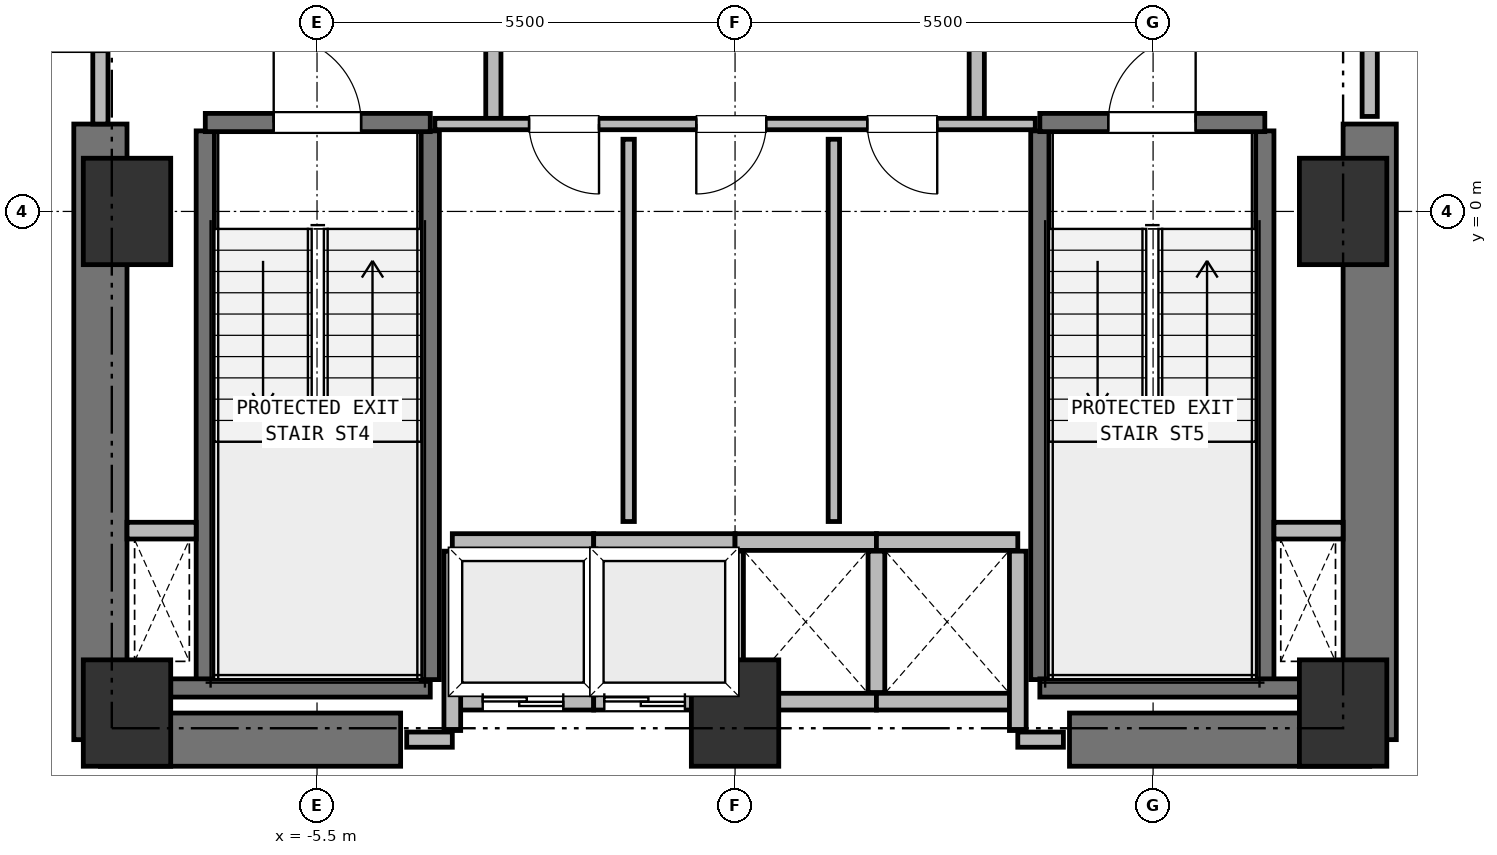
"""IFC4 building model, lengths in metres.
Left out: names, types, materials, properties, quantities, classifications, styles, units other than length and angle.
Written with IfcOpenShell. Run it as: python <this file> out.ifc"""

import sys

from ifc_helpers import new_model, si_unit, direction, frame, frame_2d, origin, origin_2d, place, context, subcontext, project, spatial, rectangle, extrude, element, fill, save


model = new_model("IFC4")
c1 = context("Model", 3, precision=1e-05, world=origin(), true_north=direction((0.0, 1.0)))
c2 = subcontext(c1, "Body", "Model", "MODEL_VIEW")
j1 = project(units=[si_unit("LENGTHUNIT", "METRE"), si_unit("PLANEANGLEUNIT", "RADIAN")], contexts=[c1])
p1 = place(None, origin())
s1 = spatial("IfcSite", under=j1, at=p1, CompositionType="ELEMENT")
p2 = place(p1, origin())
s2 = spatial("IfcBuilding", under=s1, at=p2, CompositionType="ELEMENT")
p3 = place(p2, frame((0.0, 0.0, 41.75)))
s3 = spatial("IfcBuildingStorey", under=s2, at=p3, CompositionType="ELEMENT", Elevation=41.75)
for number, where, z_axis, x_axis in (
    (1, (-8.0, -6.6, 0.0), (0.0, 0.0, 1.0), (1.0, 0.0, 0.0)),
    (2, (0.0, -6.6, 0.0), (0.0, 0.0, 1.0), (1.0, 0.0, 0.0)),
    (3, (8.0, -6.6, 0.0), (0.0, 0.0, 1.0), (1.0, 0.0, 0.0)),
    (4, (8.0, 0.0, 0.0), (0.0, 0.0, 1.0), (1.0, 0.0, 0.0)),
    (5, (-8.0, 0.0, 0.0), (0.0, 0.0, 1.0), (1.0, 0.0, 0.0)),
):
    element("IfcColumn", number, at=place(p3, frame(where, z_axis=z_axis, x_axis=x_axis)), inside=s3, PredefinedType="COLUMN", context=c2, shape_type="SweptSolid", body=[
        extrude(rectangle(XDim=1.15, YDim=1.4, at=origin_2d()), origin(), (0.0, 0.0, 1.0), 3.75),
    ])
for number, where, z_axis, x_axis in (
    (6, (-8.35, -6.95, 0.0), (0.0, 0.0, 1.0), (1.0, 0.0, 0.0)),
    (7, (4.4, -6.95, 0.0), (0.0, 0.0, 1.0), (1.0, 0.0, 0.0)),
):
    element("IfcWall", number, at=place(p3, frame(where, z_axis=z_axis, x_axis=x_axis)), inside=s3, PredefinedType="SHEAR", context=c2, shape_type="SweptSolid", body=[
        extrude(rectangle(XDim=3.95, YDim=0.7, at=frame_2d((1.975, 0.0))), origin(), (0.0, 0.0, 1.0), 3.5),
    ])
for number, where, z_axis, x_axis in (
    (8, (-8.35, -6.95, 0.0), (0.0, 0.0, 1.0), (0.0, 1.0, 0.0)),
    (9, (8.35, -6.95, 0.0), (0.0, 0.0, 1.0), (0.0, 1.0, 0.0)),
):
    element("IfcWall", number, at=place(p3, frame(where, z_axis=z_axis, x_axis=x_axis)), inside=s3, PredefinedType="SHEAR", context=c2, shape_type="SweptSolid", body=[
        extrude(rectangle(XDim=8.1, YDim=0.7, at=frame_2d((4.05, 0.0))), origin(), (0.0, 0.0, 1.0), 3.5),
    ])
p4 = place(p3, frame((-6.97, -6.16, 0.0), z_axis=(0.0, 0.0, 1.0), x_axis=(0.0, 1.0, 0.0)))
e10 = element("IfcWall", 10, at=p4, inside=s3, PredefinedType="SHEAR", context=c2, shape_type="SweptSolid", body=[
    extrude(rectangle(XDim=7.22, YDim=0.24, at=frame_2d((3.61, 0.0))), origin(), (0.0, 0.0, 1.0), 3.5),
])
p5 = place(p3, frame((-7.425, -6.27, 0.0), z_axis=(0.0, 0.0, 1.0), x_axis=(1.0, 0.0, 0.0)))
e11 = element("IfcWall", 11, at=p5, inside=s3, PredefinedType="SHEAR", context=c2, shape_type="SweptSolid", body=[
    extrude(rectangle(XDim=3.415, YDim=0.24, at=frame_2d((1.708, 0.0))), origin(), (0.0, 0.0, 1.0), 3.5),
])
p6 = place(p3, frame((-4.01, -6.16, 0.0), z_axis=(0.0, 0.0, 1.0), x_axis=(0.0, 1.0, 0.0)))
e12 = element("IfcWall", 12, at=p6, inside=s3, PredefinedType="SHEAR", context=c2, shape_type="SweptSolid", body=[
    extrude(rectangle(XDim=7.22, YDim=0.24, at=frame_2d((3.61, 0.0))), origin(), (0.0, 0.0, 1.0), 3.5),
])
p7 = place(p3, frame((-6.97, 1.17, 0.0), z_axis=(0.0, 0.0, 1.0), x_axis=(1.0, 0.0, 0.0)))
e13 = element("IfcWall", 13, at=p7, inside=s3, PredefinedType="SHEAR", context=c2, shape_type="SweptSolid", body=[
    extrude(rectangle(XDim=2.96, YDim=0.24, at=frame_2d((1.48, 0.0))), origin(), (0.0, 0.0, 1.0), 3.5),
])
p8 = place(p7, frame((0.9, 0.0, 0.0)))
e14 = element("IfcOpeningElement", 14, at=p8, cuts=e13, PredefinedType="OPENING", context=c2, shape_type="SweptSolid", body=[
    extrude(rectangle(XDim=1.15, YDim=2.15, at=frame_2d((0.575, 1.075))), frame((0.0, 0.13, 0.0), z_axis=(0.0, -1.0, 0.0), x_axis=(1.0, 0.0, 0.0)), (0.0, 0.0, 1.0), 0.26),
])
for number, where, z_axis, x_axis in (
    (15, (4.01, -6.16, 0.0), (0.0, 0.0, 1.0), (0.0, 1.0, 0.0)),
    (16, (6.97, -6.16, 0.0), (0.0, 0.0, 1.0), (0.0, 1.0, 0.0)),
):
    element("IfcWall", number, at=place(p3, frame(where, z_axis=z_axis, x_axis=x_axis)), inside=s3, PredefinedType="SHEAR", context=c2, shape_type="SweptSolid", body=[
        extrude(rectangle(XDim=7.22, YDim=0.24, at=frame_2d((3.61, 0.0))), origin(), (0.0, 0.0, 1.0), 3.5),
    ])
p9 = place(p3, frame((4.01, -6.27, 0.0), z_axis=(0.0, 0.0, 1.0), x_axis=(1.0, 0.0, 0.0)))
e17 = element("IfcWall", 17, at=p9, inside=s3, PredefinedType="SHEAR", context=c2, shape_type="SweptSolid", body=[
    extrude(rectangle(XDim=3.415, YDim=0.24, at=frame_2d((1.708, 0.0))), origin(), (0.0, 0.0, 1.0), 3.5),
])
p10 = place(p3, frame((4.01, 1.17, 0.0), z_axis=(0.0, 0.0, 1.0), x_axis=(1.0, 0.0, 0.0)))
e18 = element("IfcWall", 18, at=p10, inside=s3, PredefinedType="SHEAR", context=c2, shape_type="SweptSolid", body=[
    extrude(rectangle(XDim=2.96, YDim=0.24, at=frame_2d((1.48, 0.0))), origin(), (0.0, 0.0, 1.0), 3.5),
])
p11 = place(p10, frame((0.9, 0.0, 0.0)))
e19 = element("IfcOpeningElement", 19, at=p11, cuts=e18, PredefinedType="OPENING", context=c2, shape_type="SweptSolid", body=[
    extrude(rectangle(XDim=1.15, YDim=2.15, at=frame_2d((0.575, 1.075))), frame((0.0, 0.13, 0.0), z_axis=(0.0, -1.0, 0.0), x_axis=(1.0, 0.0, 0.0)), (0.0, 0.0, 1.0), 0.26),
])
for number, where, z_axis, x_axis in (
    (20, (-8.0, -4.2, 0.0), (0.0, 0.0, 1.0), (1.0, 0.0, 0.0)),
    (21, (7.09, -4.2, 0.0), (0.0, 0.0, 1.0), (1.0, 0.0, 0.0)),
):
    element("IfcWall", number, at=place(p3, frame(where, z_axis=z_axis, x_axis=x_axis)), inside=s3, PredefinedType="PARTITIONING", context=c2, shape_type="SweptSolid", body=[
        extrude(rectangle(XDim=0.91, YDim=0.22, at=frame_2d((0.455, 0.0))), origin(), (0.0, 0.0, 1.0), 3.5),
    ])
p12 = place(p3, frame((-3.72, -6.45, 0.0), z_axis=(0.0, 0.0, 1.0), x_axis=(1.0, 0.0, 0.0)))
e22 = element("IfcWall", 22, at=p12, inside=s3, PredefinedType="PARTITIONING", context=c2, shape_type="SweptSolid", body=[
    extrude(rectangle(XDim=1.86, YDim=0.22, at=frame_2d((0.93, 0.0))), origin(), (0.0, 0.0, 1.0), 3.08),
])
p13 = place(p12, frame((0.4, 0.0, 0.0)))
e23 = element("IfcOpeningElement", 23, at=p13, cuts=e22, PredefinedType="OPENING", context=c2, shape_type="SweptSolid", body=[
    extrude(rectangle(XDim=1.06, YDim=2.15, at=frame_2d((0.53, 1.075))), frame((0.0, 0.12, 0.0), z_axis=(0.0, -1.0, 0.0), x_axis=(1.0, 0.0, 0.0)), (0.0, 0.0, 1.0), 0.24),
])
p14 = place(p3, frame((-3.72, -4.35, 0.0), z_axis=(0.0, 0.0, 1.0), x_axis=(1.0, 0.0, 0.0)))
e24 = element("IfcWall", 24, at=p14, inside=s3, PredefinedType="PARTITIONING", context=c2, shape_type="SweptSolid", body=[
    extrude(rectangle(XDim=1.86, YDim=0.22, at=frame_2d((0.93, 0.0))), origin(), (0.0, 0.0, 1.0), 3.5),
])
p15 = place(p3, frame((-3.72, -6.83, 0.0), z_axis=(0.0, 0.0, 1.0), x_axis=(0.0, 1.0, 0.0)))
e25 = element("IfcWall", 25, at=p15, inside=s3, PredefinedType="PARTITIONING", context=c2, shape_type="SweptSolid", body=[
    extrude(rectangle(XDim=2.36, YDim=0.22, at=frame_2d((1.18, 0.0))), origin(), (0.0, 0.0, 1.0), 3.5),
])
p16 = place(p3, frame((-1.86, -6.33, 0.0), z_axis=(0.0, 0.0, 1.0), x_axis=(0.0, 1.0, 0.0)))
e26 = element("IfcWall", 26, at=p16, inside=s3, PredefinedType="PARTITIONING", context=c2, shape_type="SweptSolid", body=[
    extrude(rectangle(XDim=1.86, YDim=0.22, at=frame_2d((0.93, 0.0))), origin(), (0.0, 0.0, 1.0), 3.5),
])
p17 = place(p3, frame((-1.86, -6.45, 0.0), z_axis=(0.0, 0.0, 1.0), x_axis=(1.0, 0.0, 0.0)))
e27 = element("IfcWall", 27, at=p17, inside=s3, PredefinedType="PARTITIONING", context=c2, shape_type="SweptSolid", body=[
    extrude(rectangle(XDim=1.86, YDim=0.22, at=frame_2d((0.93, 0.0))), origin(), (0.0, 0.0, 1.0), 3.08),
])
p18 = place(p17, frame((0.14, 0.0, 0.0)))
e28 = element("IfcOpeningElement", 28, at=p18, cuts=e27, PredefinedType="OPENING", context=c2, shape_type="SweptSolid", body=[
    extrude(rectangle(XDim=1.06, YDim=2.15, at=frame_2d((0.53, 1.075))), frame((0.0, 0.12, 0.0), z_axis=(0.0, -1.0, 0.0), x_axis=(1.0, 0.0, 0.0)), (0.0, 0.0, 1.0), 0.24),
])
for number, where, z_axis, x_axis in (
    (29, (-1.86, -4.35, 0.0), (0.0, 0.0, 1.0), (1.0, 0.0, 0.0)),
    (30, (0.0, -6.33, 0.0), (0.0, 0.0, 1.0), (0.0, 1.0, 0.0)),
):
    element("IfcWall", number, at=place(p3, frame(where, z_axis=z_axis, x_axis=x_axis)), inside=s3, PredefinedType="PARTITIONING", context=c2, shape_type="SweptSolid", body=[
        extrude(rectangle(XDim=1.86, YDim=0.22, at=frame_2d((0.93, 0.0))), origin(), (0.0, 0.0, 1.0), 3.5),
    ])
p19 = place(p3, frame((0.0, -6.45, 0.0), z_axis=(0.0, 0.0, 1.0), x_axis=(1.0, 0.0, 0.0)))
e31 = element("IfcWall", 31, at=p19, inside=s3, PredefinedType="PARTITIONING", context=c2, shape_type="SweptSolid", body=[
    extrude(rectangle(XDim=1.86, YDim=0.22, at=frame_2d((0.93, 0.0))), origin(), (0.0, 0.0, 1.0), 3.08),
])
for number, where, z_axis, x_axis in (
    (32, (0.0, -4.35, 0.0), (0.0, 0.0, 1.0), (1.0, 0.0, 0.0)),
    (33, (1.86, -6.33, 0.0), (0.0, 0.0, 1.0), (0.0, 1.0, 0.0)),
):
    element("IfcWall", number, at=place(p3, frame(where, z_axis=z_axis, x_axis=x_axis)), inside=s3, PredefinedType="PARTITIONING", context=c2, shape_type="SweptSolid", body=[
        extrude(rectangle(XDim=1.86, YDim=0.22, at=frame_2d((0.93, 0.0))), origin(), (0.0, 0.0, 1.0), 3.5),
    ])
p20 = place(p3, frame((1.86, -6.45, 0.0), z_axis=(0.0, 0.0, 1.0), x_axis=(1.0, 0.0, 0.0)))
e34 = element("IfcWall", 34, at=p20, inside=s3, PredefinedType="PARTITIONING", context=c2, shape_type="SweptSolid", body=[
    extrude(rectangle(XDim=1.86, YDim=0.22, at=frame_2d((0.93, 0.0))), origin(), (0.0, 0.0, 1.0), 3.08),
])
p21 = place(p3, frame((1.86, -4.35, 0.0), z_axis=(0.0, 0.0, 1.0), x_axis=(1.0, 0.0, 0.0)))
e35 = element("IfcWall", 35, at=p21, inside=s3, PredefinedType="PARTITIONING", context=c2, shape_type="SweptSolid", body=[
    extrude(rectangle(XDim=1.86, YDim=0.22, at=frame_2d((0.93, 0.0))), origin(), (0.0, 0.0, 1.0), 3.5),
])
p22 = place(p3, frame((3.72, -6.83, 0.0), z_axis=(0.0, 0.0, 1.0), x_axis=(0.0, 1.0, 0.0)))
e36 = element("IfcWall", 36, at=p22, inside=s3, PredefinedType="PARTITIONING", context=c2, shape_type="SweptSolid", body=[
    extrude(rectangle(XDim=2.36, YDim=0.22, at=frame_2d((1.18, 0.0))), origin(), (0.0, 0.0, 1.0), 3.5),
])
p23 = place(p3, frame((-3.18, 1.15, 0.0), z_axis=(0.0, 0.0, 1.0), x_axis=(0.0, 1.0, 0.0)))
e37 = element("IfcWall", 37, at=p23, inside=s3, PredefinedType="PARTITIONING", context=c2, shape_type="SweptSolid", body=[
    extrude(rectangle(XDim=3.3, YDim=0.2, at=frame_2d((1.65, 0.0))), origin(), (0.0, 0.0, 1.0), 3.5),
])
p24 = place(p23, frame((1.08, 0.0, 0.0)))
e38 = element("IfcOpeningElement", 38, at=p24, cuts=e37, PredefinedType="OPENING", context=c2, shape_type="SweptSolid", body=[
    extrude(rectangle(XDim=1.15, YDim=2.15, at=frame_2d((0.575, 1.075))), frame((0.0, 0.11, 0.0), z_axis=(0.0, -1.0, 0.0), x_axis=(1.0, 0.0, 0.0)), (0.0, 0.0, 1.0), 0.22),
])
p25 = place(p3, frame((3.18, 1.15, 0.0), z_axis=(0.0, 0.0, 1.0), x_axis=(0.0, 1.0, 0.0)))
e39 = element("IfcWall", 39, at=p25, inside=s3, PredefinedType="PARTITIONING", context=c2, shape_type="SweptSolid", body=[
    extrude(rectangle(XDim=3.3, YDim=0.2, at=frame_2d((1.65, 0.0))), origin(), (0.0, 0.0, 1.0), 3.5),
])
p26 = place(p25, frame((1.08, 0.0, 0.0)))
e40 = element("IfcOpeningElement", 40, at=p26, cuts=e39, PredefinedType="OPENING", context=c2, shape_type="SweptSolid", body=[
    extrude(rectangle(XDim=1.15, YDim=2.15, at=frame_2d((0.575, 1.075))), frame((0.0, 0.11, 0.0), z_axis=(0.0, -1.0, 0.0), x_axis=(1.0, 0.0, 0.0)), (0.0, 0.0, 1.0), 0.22),
])
p27 = place(p3, frame((-8.35, 1.15, 0.0), z_axis=(0.0, 0.0, 1.0), x_axis=(0.0, 1.0, 0.0)))
e41 = element("IfcWall", 41, at=p27, inside=s3, PredefinedType="PARTITIONING", context=c2, shape_type="SweptSolid", body=[
    extrude(rectangle(XDim=5.4, YDim=0.2, at=frame_2d((2.7, 0.0))), origin(), (0.0, 0.0, 1.0), 3.5),
])
p28 = place(p27, frame((0.95, 0.0, 0.0)))
e42 = element("IfcOpeningElement", 42, at=p28, cuts=e41, PredefinedType="OPENING", context=c2, shape_type="SweptSolid", body=[
    extrude(rectangle(XDim=1.15, YDim=2.15, at=frame_2d((0.575, 1.075))), frame((0.0, 0.11, 0.0), z_axis=(0.0, -1.0, 0.0), x_axis=(1.0, 0.0, 0.0)), (0.0, 0.0, 1.0), 0.22),
])
p29 = place(p3, frame((8.35, 1.25, 0.0), z_axis=(0.0, 0.0, 1.0), x_axis=(0.0, 1.0, 0.0)))
e43 = element("IfcWall", 43, at=p29, inside=s3, PredefinedType="PARTITIONING", context=c2, shape_type="SweptSolid", body=[
    extrude(rectangle(XDim=5.3, YDim=0.2, at=frame_2d((2.65, 0.0))), origin(), (0.0, 0.0, 1.0), 3.5),
])
p30 = place(p29, frame((0.95, 0.0, 0.0)))
e44 = element("IfcOpeningElement", 44, at=p30, cuts=e43, PredefinedType="OPENING", context=c2, shape_type="SweptSolid", body=[
    extrude(rectangle(XDim=1.15, YDim=2.15, at=frame_2d((0.575, 1.075))), frame((0.0, 0.11, 0.0), z_axis=(0.0, -1.0, 0.0), x_axis=(1.0, 0.0, 0.0)), (0.0, 0.0, 1.0), 0.22),
])
p31 = place(p3, frame((3.95, 1.15, 0.0), z_axis=(0.0, 0.0, 1.0), x_axis=(-1.0, 0.0, 0.0)))
e45 = element("IfcWall", 45, at=p31, inside=s3, PredefinedType="PARTITIONING", context=c2, shape_type="SweptSolid", body=[
    extrude(rectangle(XDim=7.9, YDim=0.15, at=frame_2d((3.95, 0.0))), origin(), (0.0, 0.0, 1.0), 3.5),
])
p32 = place(p31, frame((5.74, 0.0, 0.0)))
e46 = element("IfcOpeningElement", 46, at=p32, cuts=e45, PredefinedType="OPENING", context=c2, shape_type="SweptSolid", body=[
    extrude(rectangle(XDim=0.92, YDim=2.05, at=frame_2d((0.46, 1.025))), frame((0.0, 0.085, 0.0), z_axis=(0.0, -1.0, 0.0), x_axis=(1.0, 0.0, 0.0)), (0.0, 0.0, 1.0), 0.17),
])
p33 = place(p31, frame((3.54, 0.0, 0.0)))
e47 = element("IfcOpeningElement", 47, at=p33, cuts=e45, PredefinedType="OPENING", context=c2, shape_type="SweptSolid", body=[
    extrude(rectangle(XDim=0.92, YDim=2.05, at=frame_2d((0.46, 1.025))), frame((0.0, 0.085, 0.0), z_axis=(0.0, -1.0, 0.0), x_axis=(1.0, 0.0, 0.0)), (0.0, 0.0, 1.0), 0.17),
])
p34 = place(p31, frame((1.29, 0.0, 0.0)))
e48 = element("IfcOpeningElement", 48, at=p34, cuts=e45, PredefinedType="OPENING", context=c2, shape_type="SweptSolid", body=[
    extrude(rectangle(XDim=0.92, YDim=2.05, at=frame_2d((0.46, 1.025))), frame((0.0, 0.085, 0.0), z_axis=(0.0, -1.0, 0.0), x_axis=(1.0, 0.0, 0.0)), (0.0, 0.0, 1.0), 0.17),
])
for number, where, z_axis, x_axis in (
    (49, (-4.32, -6.95, 0.0), (0.0, 0.0, 1.0), (1.0, 0.0, 0.0)),
    (50, (3.72, -6.95, 0.0), (0.0, 0.0, 1.0), (1.0, 0.0, 0.0)),
):
    element("IfcWall", number, at=place(p3, frame(where, z_axis=z_axis, x_axis=x_axis)), inside=s3, PredefinedType="PARTITIONING", context=c2, shape_type="SweptSolid", body=[
        extrude(rectangle(XDim=0.6, YDim=0.2, at=frame_2d((0.3, 0.0))), origin(), (0.0, 0.0, 1.0), 3.5),
    ])
for number, where, z_axis, x_axis in (
    (51, (-1.4, -4.08, 0.0), (0.0, 0.0, 1.0), (0.0, 1.0, 0.0)),
    (52, (1.3, -4.08, 0.0), (0.0, 0.0, 1.0), (0.0, 1.0, 0.0)),
):
    element("IfcWall", number, at=place(p3, frame(where, z_axis=z_axis, x_axis=x_axis)), inside=s3, PredefinedType="PARTITIONING", context=c2, shape_type="SweptSolid", body=[
        extrude(rectangle(XDim=5.03, YDim=0.15, at=frame_2d((2.515, 0.0))), origin(), (0.0, 0.0, 1.0), 3.5),
    ])
p35 = place(p3, frame((10.752, -7.178, 0.0), z_axis=(0.0, 0.0, 1.0), x_axis=(-0.707067066127, -0.707146494016, 0.0)))
e53 = element("IfcWall", 53, at=p35, inside=s3, PredefinedType="PARTITIONING", context=c2, shape_type="SweptSolid", body=[
    extrude(rectangle(XDim=3.074, YDim=0.15, at=frame_2d((1.537, 0.0))), origin(), (0.0, 0.0, 1.0), 3.12),
])
p36 = place(p3, frame((-8.578, -9.352, 0.0), z_axis=(0.0, 0.0, 1.0), x_axis=(-0.707067066127, 0.707146494016, 0.0)))
e54 = element("IfcWall", 54, at=p36, inside=s3, PredefinedType="PARTITIONING", context=c2, shape_type="SweptSolid", body=[
    extrude(rectangle(XDim=3.074, YDim=0.15, at=frame_2d((1.537, 0.0))), origin(), (0.0, 0.0, 1.0), 3.5),
])
p37 = place(p8, origin())
e55 = element("IfcDoor", 55, at=p37, inside=s3, OperationType="SINGLE_SWING_LEFT", PredefinedType="DOOR", context=c2, shape_type="SweptSolid", body=[
    extrude(rectangle(XDim=1.15, YDim=2.15, at=frame_2d((0.575, 1.075))), frame((0.0, 0.025, 0.0), z_axis=(0.0, -1.0, 0.0), x_axis=(1.0, 0.0, 0.0)), (0.0, 0.0, 1.0), 0.05),
])
fill(e14, e55)
p38 = place(p11, origin())
e56 = element("IfcDoor", 56, at=p38, inside=s3, OperationType="SINGLE_SWING_RIGHT", PredefinedType="DOOR", context=c2, shape_type="SweptSolid", body=[
    extrude(rectangle(XDim=1.15, YDim=2.15, at=frame_2d((0.575, 1.075))), frame((0.0, 0.025, 0.0), z_axis=(0.0, -1.0, 0.0), x_axis=(1.0, 0.0, 0.0)), (0.0, 0.0, 1.0), 0.05),
])
fill(e19, e56)
p39 = place(p13, origin())
e57 = element("IfcDoor", 57, at=p39, inside=s3, OperationType="DOUBLE_DOOR_SLIDING", PredefinedType="DOOR", context=c2, shape_type="SweptSolid", body=[
    extrude(rectangle(XDim=1.06, YDim=2.15, at=frame_2d((0.53, 1.075))), frame((0.0, 0.025, 0.0), z_axis=(0.0, -1.0, 0.0), x_axis=(1.0, 0.0, 0.0)), (0.0, 0.0, 1.0), 0.05),
])
fill(e23, e57)
p40 = place(p18, origin())
e58 = element("IfcDoor", 58, at=p40, inside=s3, OperationType="DOUBLE_DOOR_SLIDING", PredefinedType="DOOR", context=c2, shape_type="SweptSolid", body=[
    extrude(rectangle(XDim=1.06, YDim=2.15, at=frame_2d((0.53, 1.075))), frame((0.0, 0.025, 0.0), z_axis=(0.0, -1.0, 0.0), x_axis=(1.0, 0.0, 0.0)), (0.0, 0.0, 1.0), 0.05),
])
fill(e28, e58)
p41 = place(p28, origin())
e59 = element("IfcDoor", 59, at=p41, inside=s3, OperationType="SINGLE_SWING_LEFT", PredefinedType="DOOR", context=c2, shape_type="SweptSolid", body=[
    extrude(rectangle(XDim=1.15, YDim=2.15, at=frame_2d((0.575, 1.075))), frame((0.0, 0.025, 0.0), z_axis=(0.0, -1.0, 0.0), x_axis=(1.0, 0.0, 0.0)), (0.0, 0.0, 1.0), 0.05),
])
fill(e42, e59)
p42 = place(p32, origin())
e60 = element("IfcDoor", 60, at=p42, inside=s3, OperationType="SINGLE_SWING_LEFT", PredefinedType="DOOR", context=c2, shape_type="SweptSolid", body=[
    extrude(rectangle(XDim=0.92, YDim=2.05, at=frame_2d((0.46, 1.025))), frame((0.0, 0.025, 0.0), z_axis=(0.0, -1.0, 0.0), x_axis=(1.0, 0.0, 0.0)), (0.0, 0.0, 1.0), 0.05),
])
fill(e46, e60)
p43 = place(p33, origin())
e61 = element("IfcDoor", 61, at=p43, inside=s3, OperationType="SINGLE_SWING_RIGHT", PredefinedType="DOOR", context=c2, shape_type="SweptSolid", body=[
    extrude(rectangle(XDim=0.92, YDim=2.05, at=frame_2d((0.46, 1.025))), frame((0.0, 0.025, 0.0), z_axis=(0.0, -1.0, 0.0), x_axis=(1.0, 0.0, 0.0)), (0.0, 0.0, 1.0), 0.05),
])
fill(e47, e61)
p44 = place(p34, origin())
e62 = element("IfcDoor", 62, at=p44, inside=s3, OperationType="SINGLE_SWING_LEFT", PredefinedType="DOOR", context=c2, shape_type="SweptSolid", body=[
    extrude(rectangle(XDim=0.92, YDim=2.05, at=frame_2d((0.46, 1.025))), frame((0.0, 0.025, 0.0), z_axis=(0.0, -1.0, 0.0), x_axis=(1.0, 0.0, 0.0)), (0.0, 0.0, 1.0), 0.05),
])
fill(e48, e62)
save(model, sys.argv[1])
